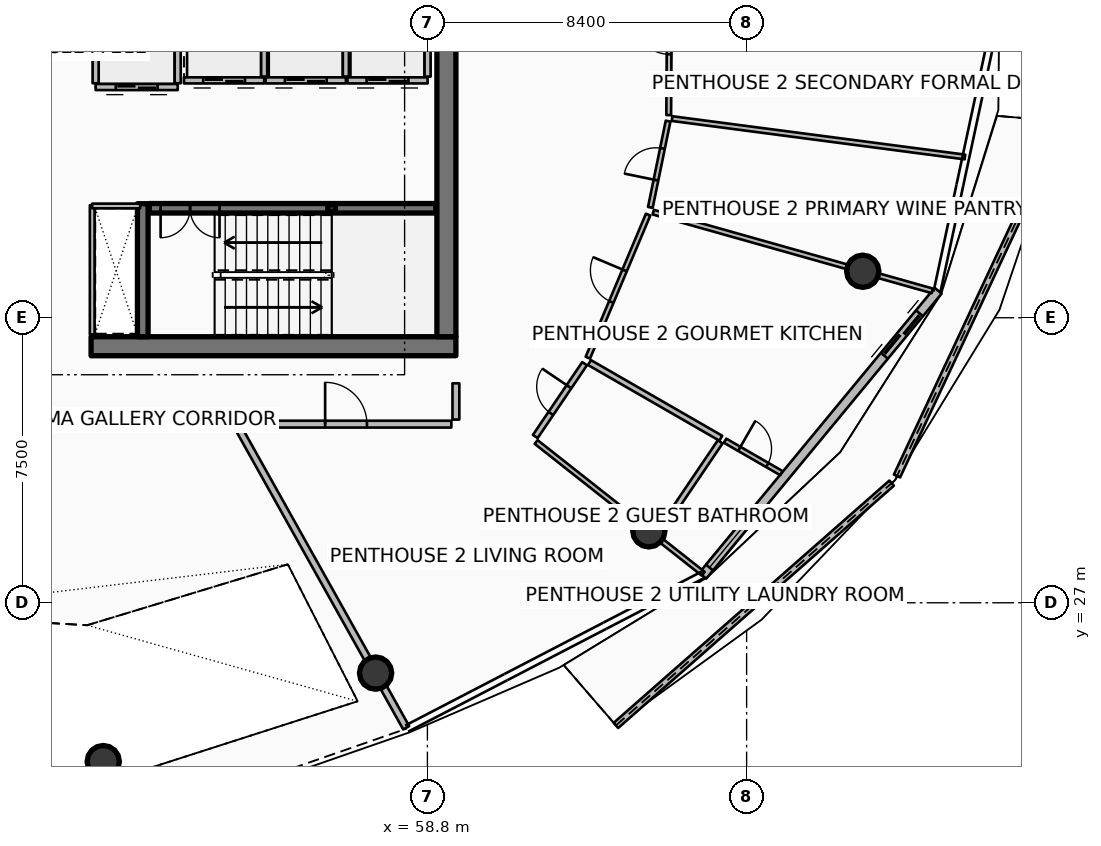
"""IFC4 building model, lengths in metres.
Left out: names, types, materials, properties, quantities, classifications, styles, units other than length and angle.
Written with IfcOpenShell. Run it as: python <this file> out.ifc"""

import sys

from ifc_helpers import new_model, si_unit, direction, frame, frame_2d, origin, origin_2d, place, context, subcontext, project, spatial, polyline, rectangle, hollow_rectangle, circle, outline, extrude, element, fill, save


model = new_model("IFC4")
c1 = context("Model", 3, precision=1e-05, world=origin(), true_north=direction((0.0, 1.0)))
c2 = subcontext(c1, "Body", "Model", "MODEL_VIEW")
j1 = project(units=[si_unit("LENGTHUNIT", "METRE"), si_unit("PLANEANGLEUNIT", "RADIAN")], contexts=[c1])
p1 = place(None, origin())
s1 = spatial("IfcSite", under=j1, at=p1, CompositionType="ELEMENT")
p2 = place(p1, origin())
s2 = spatial("IfcBuilding", under=s1, at=p2, CompositionType="ELEMENT")
p3 = place(p2, frame((0.0, 0.0, 326.3)))
s3 = spatial("IfcBuildingStorey", under=s2, at=p3, CompositionType="ELEMENT", Elevation=326.3)
p4 = place(p3, frame((49.95, 33.75, 0.0), z_axis=(0.0, 0.0, 1.0), x_axis=(1.0, 0.0, 0.0)))
e1 = element("IfcWall", 1, at=p4, inside=s3, PredefinedType="SHEAR", context=c2, shape_type="SweptSolid", body=[
    extrude(rectangle(XDim=9.6, YDim=0.5, at=frame_2d((4.8, 0.0))), origin(), (0.0, 0.0, 1.0), 4.2),
])
p5 = place(p3, frame((59.3, 34.0, 0.0), z_axis=(0.0, 0.0, 1.0), x_axis=(0.0, 1.0, 0.0)))
e2 = element("IfcWall", 2, at=p5, inside=s3, PredefinedType="SHEAR", context=c2, shape_type="SweptSolid", body=[
    extrude(rectangle(XDim=16.0, YDim=0.5, at=frame_2d((8.0, 0.0))), origin(), (0.0, 0.0, 1.0), 4.2),
])
p6 = place(p3, frame((51.31, 34.0, 0.0), z_axis=(0.0, 0.0, 1.0), x_axis=(0.0, 1.0, 0.0)))
e3 = element("IfcWall", 3, at=p6, inside=s3, PredefinedType="SHEAR", context=c2, shape_type="SweptSolid", body=[
    extrude(rectangle(XDim=3.5, YDim=0.28, at=frame_2d((1.75, 0.0))), origin(), (0.0, 0.0, 1.0), 4.2),
])
p7 = place(p3, frame((56.28, 37.38, 0.0), z_axis=(0.0, 0.0, 1.0), x_axis=(1.0, 0.0, 0.0)))
e4 = element("IfcColumn", 4, at=p7, inside=s3, PredefinedType="COLUMN", context=c2, shape_type="SweptSolid", body=[
    extrude(hollow_rectangle(XDim=0.2, YDim=0.2, WallThickness=0.01, InnerFilletRadius=0.01, OuterFilletRadius=0.02, at=origin_2d()), origin(), (0.0, 0.0, 1.0), 1.895),
])
p8 = place(p3, frame((50.27, 22.821, 0.0), z_axis=(0.0, 0.0, 1.0), x_axis=(1.0, 0.0, 0.0)))
e5 = element("IfcColumn", 5, at=p8, inside=s3, PredefinedType="COLUMN", context=c2, shape_type="SweptSolid", body=[
    extrude(circle(Radius=0.425, at=origin_2d()), origin(), (0.0, 0.0, 1.0), 4.196),
])
for number, where, z_axis, x_axis in (
    (6, (57.437, 25.149, 0.0), (0.0, 0.0, 1.0), (1.0, 0.0, 0.0)),
    (7, (64.626, 28.893, 0.0), (0.0, 0.0, 1.0), (1.0, 0.0, 0.0)),
    (8, (70.256, 35.723, 0.0), (0.0, 0.0, 1.0), (1.0, 0.0, 0.0)),
):
    element("IfcColumn", number, at=place(p3, frame(where, z_axis=z_axis, x_axis=x_axis)), inside=s3, PredefinedType="COLUMN", context=c2, shape_type="SweptSolid", body=[
        extrude(circle(Radius=0.425, at=origin_2d()), origin(), (0.0, 0.0, 1.0), 3.94),
    ])
p9 = place(p3, frame((63.761, 23.773, 0.0), z_axis=(0.0, 0.0, 1.0), x_axis=(0.751214275419, 0.660058415905, 0.0)))
e9 = element("IfcWall", 9, at=p9, inside=s3, PredefinedType="PARAPET", context=c2, shape_type="SweptSolid", body=[
    extrude(outline(polyline([(0.0, 0.0), (9.658, 0.0), (9.658, 1.148), (4.829, 1.284), (0.0, 1.483), (0.0, 0.0)])), frame((0.0, 0.09, 0.0), z_axis=(0.0, -1.0, 0.0), x_axis=(1.0, 0.0, 0.0)), (0.0, 0.0, 1.0), 0.18),
])
p10 = place(p3, frame((71.157, 30.336, 0.0), z_axis=(0.0, 0.0, 1.0), x_axis=(0.424201912102, 0.905567632907, 0.0)))
e10 = element("IfcWall", 10, at=p10, inside=s3, PredefinedType="PARAPET", context=c2, shape_type="SweptSolid", body=[
    extrude(outline(polyline([(0.0, 0.0), (10.302, 0.0), (10.302, 1.224), (5.151, 1.127), (0.0, 1.148), (0.0, 0.0)])), frame((0.0, 0.09, 0.0), z_axis=(0.0, -1.0, 0.0), x_axis=(1.0, 0.0, 0.0)), (0.0, 0.0, 1.0), 0.18),
])
p11 = place(p3, frame((66.045, 27.711, 0.0), z_axis=(0.0, 0.0, 1.0), x_axis=(0.636803612721, 0.771026042897, 0.0)))
e11 = element("IfcWall", 11, at=p11, inside=s3, PredefinedType="SOLIDWALL", context=c2, shape_type="SweptSolid", body=[
    extrude(rectangle(XDim=9.728, YDim=0.24, at=frame_2d((4.864, 0.0))), origin(), (0.0, 0.0, 1.0), 2.89),
])
p12 = place(p11, frame((7.508, 0.0, 0.0)))
e12 = element("IfcOpeningElement", 12, at=p12, cuts=e11, PredefinedType="OPENING", context=c2, shape_type="SweptSolid", body=[
    extrude(rectangle(XDim=1.45, YDim=2.15, at=frame_2d((0.725, 1.075))), frame((0.0, 0.13, 0.0), z_axis=(0.0, -1.0, 0.0), x_axis=(1.0, 0.0, 0.0)), (0.0, 0.0, 1.0), 0.26),
])
p13 = place(p11, frame((0.28, 0.0, 0.65)))
e13 = element("IfcOpeningElement", 13, at=p13, cuts=e11, PredefinedType="OPENING", context=c2, shape_type="SweptSolid", body=[
    extrude(rectangle(XDim=1.6, YDim=1.5, at=frame_2d((0.8, 0.75))), frame((0.0, 0.13, 0.0), z_axis=(0.0, -1.0, 0.0), x_axis=(1.0, 0.0, 0.0)), (0.0, 0.0, 1.0), 0.26),
])
p14 = place(p3, frame((51.48, 37.38, 0.0), z_axis=(0.0, 0.0, 1.0), x_axis=(1.0, 0.0, 0.0)))
e14 = element("IfcWall", 14, at=p14, inside=s3, PredefinedType="SOLIDWALL", context=c2, shape_type="SweptSolid", body=[
    extrude(rectangle(XDim=7.54, YDim=0.25, at=frame_2d((3.77, 0.0))), origin(), (0.0, 0.0, 1.0), 3.94),
])
p15 = place(p14, frame((0.3, 0.0, 0.0)))
e15 = element("IfcOpeningElement", 15, at=p15, cuts=e14, PredefinedType="OPENING", context=c2, shape_type="SweptSolid", body=[
    extrude(rectangle(XDim=1.55, YDim=2.15, at=frame_2d((0.775, 1.075))), frame((0.0, 0.135, 0.0), z_axis=(0.0, -1.0, 0.0), x_axis=(1.0, 0.0, 0.0)), (0.0, 0.0, 1.0), 0.27),
])
p16 = place(p3, frame((54.505, 40.745, 0.0), z_axis=(0.0, 0.0, 1.0), x_axis=(-1.0, 0.0, 0.0)))
e16 = element("IfcWall", 16, at=p16, inside=s3, PredefinedType="PARTITIONING", context=c2, shape_type="SweptSolid", body=[
    extrude(rectangle(XDim=2.11, YDim=0.16, at=frame_2d((1.055, 0.0))), origin(), (0.0, 0.0, 1.0), 3.94),
])
p17 = place(p16, frame((0.505, 0.0, 0.0)))
e17 = element("IfcOpeningElement", 17, at=p17, cuts=e16, PredefinedType="OPENING", context=c2, shape_type="SweptSolid", body=[
    extrude(rectangle(XDim=1.1, YDim=2.1, at=frame_2d((0.55, 1.05))), frame((0.0, 0.09, 0.0), z_axis=(0.0, -1.0, 0.0), x_axis=(1.0, 0.0, 0.0)), (0.0, 0.0, 1.0), 0.18),
])
p18 = place(p3, frame((54.505, 40.845, 0.0), z_axis=(0.0, 0.0, 1.0), x_axis=(0.0, 1.0, 0.0)))
e18 = element("IfcWall", 18, at=p18, inside=s3, PredefinedType="PARTITIONING", context=c2, shape_type="SweptSolid", body=[
    extrude(rectangle(XDim=1.61, YDim=0.16, at=frame_2d((0.805, 0.0))), origin(), (0.0, 0.0, 1.0), 3.94),
])
p19 = place(p3, frame((56.655, 40.745, 0.0), z_axis=(0.0, 0.0, 1.0), x_axis=(-1.0, 0.0, 0.0)))
e19 = element("IfcWall", 19, at=p19, inside=s3, PredefinedType="PARTITIONING", context=c2, shape_type="SweptSolid", body=[
    extrude(rectangle(XDim=2.11, YDim=0.16, at=frame_2d((1.055, 0.0))), origin(), (0.0, 0.0, 1.0), 3.94),
])
p20 = place(p19, frame((0.505, 0.0, 0.0)))
e20 = element("IfcOpeningElement", 20, at=p20, cuts=e19, PredefinedType="OPENING", context=c2, shape_type="SweptSolid", body=[
    extrude(rectangle(XDim=1.1, YDim=2.1, at=frame_2d((0.55, 1.05))), frame((0.0, 0.09, 0.0), z_axis=(0.0, -1.0, 0.0), x_axis=(1.0, 0.0, 0.0)), (0.0, 0.0, 1.0), 0.18),
])
p21 = place(p3, frame((56.655, 40.845, 0.0), z_axis=(0.0, 0.0, 1.0), x_axis=(0.0, 1.0, 0.0)))
e21 = element("IfcWall", 21, at=p21, inside=s3, PredefinedType="PARTITIONING", context=c2, shape_type="SweptSolid", body=[
    extrude(rectangle(XDim=1.61, YDim=0.16, at=frame_2d((0.805, 0.0))), origin(), (0.0, 0.0, 1.0), 3.94),
])
p22 = place(p3, frame((58.805, 40.745, 0.0), z_axis=(0.0, 0.0, 1.0), x_axis=(-1.0, 0.0, 0.0)))
e22 = element("IfcWall", 22, at=p22, inside=s3, PredefinedType="PARTITIONING", context=c2, shape_type="SweptSolid", body=[
    extrude(rectangle(XDim=2.11, YDim=0.16, at=frame_2d((1.055, 0.0))), origin(), (0.0, 0.0, 1.0), 3.94),
])
p23 = place(p22, frame((0.505, 0.0, 0.0)))
e23 = element("IfcOpeningElement", 23, at=p23, cuts=e22, PredefinedType="OPENING", context=c2, shape_type="SweptSolid", body=[
    extrude(rectangle(XDim=1.1, YDim=2.1, at=frame_2d((0.55, 1.05))), frame((0.0, 0.09, 0.0), z_axis=(0.0, -1.0, 0.0), x_axis=(1.0, 0.0, 0.0)), (0.0, 0.0, 1.0), 0.18),
])
p24 = place(p3, frame((58.805, 40.845, 0.0), z_axis=(0.0, 0.0, 1.0), x_axis=(0.0, 1.0, 0.0)))
e24 = element("IfcWall", 24, at=p24, inside=s3, PredefinedType="PARTITIONING", context=c2, shape_type="SweptSolid", body=[
    extrude(rectangle(XDim=1.61, YDim=0.16, at=frame_2d((0.805, 0.0))), origin(), (0.0, 0.0, 1.0), 3.94),
])
p25 = place(p3, frame((52.23, 40.57, 0.0), z_axis=(0.0, 0.0, 1.0), x_axis=(-1.0, 0.0, 0.0)))
e25 = element("IfcWall", 25, at=p25, inside=s3, PredefinedType="PARTITIONING", context=c2, shape_type="SweptSolid", body=[
    extrude(rectangle(XDim=2.16, YDim=0.16, at=frame_2d((1.08, 0.0))), origin(), (0.0, 0.0, 1.0), 3.94),
])
p26 = place(p25, frame((0.53, 0.0, 0.0)))
e26 = element("IfcOpeningElement", 26, at=p26, cuts=e25, PredefinedType="OPENING", context=c2, shape_type="SweptSolid", body=[
    extrude(rectangle(XDim=1.1, YDim=2.1, at=frame_2d((0.55, 1.05))), frame((0.0, 0.09, 0.0), z_axis=(0.0, -1.0, 0.0), x_axis=(1.0, 0.0, 0.0)), (0.0, 0.0, 1.0), 0.18),
])
for number, where, z_axis, x_axis in (
    (27, (52.23, 40.67, 0.0), (0.0, 0.0, 1.0), (0.0, 1.0, 0.0)),
    (28, (50.07, 40.67, 0.0), (0.0, 0.0, 1.0), (0.0, 1.0, 0.0)),
):
    element("IfcWall", number, at=place(p3, frame(where, z_axis=z_axis, x_axis=x_axis)), inside=s3, PredefinedType="PARTITIONING", context=c2, shape_type="SweptSolid", body=[
        extrude(rectangle(XDim=2.16, YDim=0.16, at=frame_2d((1.08, 0.0))), origin(), (0.0, 0.0, 1.0), 3.94),
    ])
p27 = place(p3, frame((49.98, 34.06, 0.0), z_axis=(0.0, 0.0, 1.0), x_axis=(0.0, 1.0, 0.0)))
e29 = element("IfcWall", 29, at=p27, inside=s3, PredefinedType="PARTITIONING", context=c2, shape_type="SweptSolid", body=[
    extrude(rectangle(XDim=3.4, YDim=0.125, at=frame_2d((1.7, 0.0))), origin(), (0.0, 0.0, 1.0), 3.38),
])
p28 = place(p3, frame((49.98, 37.44, 0.0), z_axis=(0.0, 0.0, 1.0), x_axis=(1.0, 0.0, 0.0)))
e30 = element("IfcWall", 30, at=p28, inside=s3, PredefinedType="PARTITIONING", context=c2, shape_type="SweptSolid", body=[
    extrude(rectangle(XDim=1.26, YDim=0.125, at=frame_2d((0.63, 0.0))), origin(), (0.0, 0.0, 1.0), 3.38),
])
p29 = place(p3, frame((45.165, 31.7, 0.0), z_axis=(0.0, 0.0, 1.0), x_axis=(1.0, 0.0, 0.0)))
e31 = element("IfcWall", 31, at=p29, inside=s3, PredefinedType="SOLIDWALL", context=c2, shape_type="SweptSolid", body=[
    extrude(rectangle(XDim=8.533, YDim=0.24, at=frame_2d((4.267, 0.0))), origin(), (0.0, 0.0, 1.0), 3.38),
])
p30 = place(p3, frame((53.768, 31.7, 0.0), z_axis=(0.0, 0.0, 1.0), x_axis=(0.488623665245, -0.872494649704, 0.0)))
e32 = element("IfcWall", 32, at=p30, inside=s3, PredefinedType="PARTITIONING", context=c2, shape_type="SweptSolid", body=[
    extrude(rectangle(XDim=9.157, YDim=0.18, at=frame_2d((4.579, 0.0))), origin(), (0.0, 0.0, 1.0), 3.38),
])
p31 = place(p3, frame((53.888, 31.7, 0.0), z_axis=(0.0, 0.0, 1.0), x_axis=(1.0, 0.0, 0.0)))
e33 = element("IfcWall", 33, at=p31, inside=s3, PredefinedType="PARTITIONING", context=c2, shape_type="SweptSolid", body=[
    extrude(rectangle(XDim=5.542, YDim=0.18, at=frame_2d((2.771, 0.0))), origin(), (0.0, 0.0, 1.0), 3.38),
])
p32 = place(p31, frame((2.221, 0.0, 0.0)))
e34 = element("IfcOpeningElement", 34, at=p32, cuts=e33, PredefinedType="OPENING", context=c2, shape_type="SweptSolid", body=[
    extrude(rectangle(XDim=1.1, YDim=2.1, at=frame_2d((0.55, 1.05))), frame((0.0, 0.1, 0.0), z_axis=(0.0, -1.0, 0.0), x_axis=(1.0, 0.0, 0.0)), (0.0, 0.0, 1.0), 0.2),
])
p33 = place(p3, frame((59.55, 31.82, 0.0), z_axis=(0.0, 0.0, 1.0), x_axis=(0.0, 1.0, 0.0)))
e35 = element("IfcWall", 35, at=p33, inside=s3, PredefinedType="PARTITIONING", context=c2, shape_type="SweptSolid", body=[
    extrude(rectangle(XDim=0.955, YDim=0.18, at=frame_2d((0.477, 0.0))), origin(), (0.0, 0.0, 1.0), 3.38),
])
p34 = place(p3, frame((61.661, 31.23, 0.0), z_axis=(0.0, 0.0, 1.0), x_axis=(0.785321366699, -0.61908832246, 0.0)))
e36 = element("IfcWall", 36, at=p34, inside=s3, PredefinedType="PARTITIONING", context=c2, shape_type="SweptSolid", body=[
    extrude(rectangle(XDim=5.597, YDim=0.125, at=frame_2d((2.799, 0.0))), origin(), (0.0, 0.0, 1.0), 3.38),
])
p35 = place(p3, frame((61.639, 31.375, 0.0), z_axis=(0.0, 0.0, 1.0), x_axis=(0.56062651507, 0.828068783738, 0.0)))
e37 = element("IfcWall", 37, at=p35, inside=s3, PredefinedType="PARTITIONING", context=c2, shape_type="SweptSolid", body=[
    extrude(rectangle(XDim=2.314, YDim=0.15, at=frame_2d((1.157, 0.0))), origin(), (0.0, 0.0, 1.0), 3.38),
])
p36 = place(p35, frame((0.732, 0.0, 0.0)))
e38 = element("IfcOpeningElement", 38, at=p36, cuts=e37, PredefinedType="OPENING", context=c2, shape_type="SweptSolid", body=[
    extrude(rectangle(XDim=0.85, YDim=2.06, at=frame_2d((0.425, 1.03))), frame((0.0, 0.085, 0.0), z_axis=(0.0, -1.0, 0.0), x_axis=(1.0, 0.0, 0.0)), (0.0, 0.0, 1.0), 0.17),
])
p37 = place(p3, frame((64.874, 28.825, 0.0), z_axis=(0.0, 0.0, 1.0), x_axis=(0.560532780406, 0.82813223708, 0.0)))
e39 = element("IfcWall", 39, at=p37, inside=s3, PredefinedType="PARTITIONING", context=c2, shape_type="SweptSolid", body=[
    extrude(rectangle(XDim=2.91, YDim=0.15, at=frame_2d((1.455, 0.0))), origin(), (0.0, 0.0, 1.0), 3.38),
])
p38 = place(p3, frame((63.065, 33.321, 0.0), z_axis=(0.0, 0.0, 1.0), x_axis=(0.866490095299, -0.499194265541, 0.0)))
e40 = element("IfcWall", 40, at=p38, inside=s3, PredefinedType="PARTITIONING", context=c2, shape_type="SweptSolid", body=[
    extrude(rectangle(XDim=3.989, YDim=0.15, at=frame_2d((1.994, 0.0))), origin(), (0.0, 0.0, 1.0), 3.38),
])
p39 = place(p3, frame((66.634, 31.265, 0.0), z_axis=(0.0, 0.0, 1.0), x_axis=(0.866444624685, -0.499273184094, 0.0)))
e41 = element("IfcWall", 41, at=p39, inside=s3, PredefinedType="PARTITIONING", context=c2, shape_type="SweptSolid", body=[
    extrude(rectangle(XDim=1.709, YDim=0.125, at=frame_2d((0.855, 0.0))), origin(), (0.0, 0.0, 1.0), 3.38),
])
p40 = place(p39, frame((0.43, 0.0, 0.0)))
e42 = element("IfcOpeningElement", 42, at=p40, cuts=e41, PredefinedType="OPENING", context=c2, shape_type="SweptSolid", body=[
    extrude(rectangle(XDim=0.85, YDim=2.06, at=frame_2d((0.425, 1.03))), frame((0.0, 0.073, 0.0), z_axis=(0.0, -1.0, 0.0), x_axis=(1.0, 0.0, 0.0)), (0.0, 0.0, 1.0), 0.145),
])
p41 = place(p3, frame((63.021, 33.448, 0.0), z_axis=(0.0, 0.0, 1.0), x_axis=(0.388350881923, 0.921511580236, 0.0)))
e43 = element("IfcWall", 43, at=p41, inside=s3, PredefinedType="PARTITIONING", context=c2, shape_type="SweptSolid", body=[
    extrude(rectangle(XDim=4.085, YDim=0.125, at=frame_2d((2.042, 0.0))), origin(), (0.0, 0.0, 1.0), 3.38),
])
p42 = place(p41, frame((1.593, 0.0, 0.0)))
e44 = element("IfcOpeningElement", 44, at=p42, cuts=e43, PredefinedType="OPENING", context=c2, shape_type="SweptSolid", body=[
    extrude(rectangle(XDim=0.9, YDim=2.08, at=frame_2d((0.45, 1.04))), frame((0.0, 0.073, 0.0), z_axis=(0.0, -1.0, 0.0), x_axis=(1.0, 0.0, 0.0)), (0.0, 0.0, 1.0), 0.145),
])
p43 = place(p3, frame((64.743, 37.278, 0.0), z_axis=(0.0, 0.0, 1.0), x_axis=(0.962455248497, -0.271440407162, 0.0)))
e45 = element("IfcWall", 45, at=p43, inside=s3, PredefinedType="PARTITIONING", context=c2, shape_type="SweptSolid", body=[
    extrude(rectangle(XDim=7.631, YDim=0.125, at=frame_2d((3.815, 0.0))), origin(), (0.0, 0.0, 1.0), 3.38),
])
p44 = place(p3, frame((65.238, 39.74, 0.0), z_axis=(0.0, 0.0, 1.0), x_axis=(0.991512783403, -0.130009231784, 0.0)))
e46 = element("IfcWall", 46, at=p44, inside=s3, PredefinedType="PARTITIONING", context=c2, shape_type="SweptSolid", body=[
    extrude(rectangle(XDim=7.772, YDim=0.125, at=frame_2d((3.886, 0.0))), origin(), (0.0, 0.0, 1.0), 3.38),
])
p45 = place(p3, frame((64.667, 37.403, 0.0), z_axis=(0.0, 0.0, 1.0), x_axis=(0.201239677413, 0.979542031888, 0.0)))
e47 = element("IfcWall", 47, at=p45, inside=s3, PredefinedType="PARTITIONING", context=c2, shape_type="SweptSolid", body=[
    extrude(rectangle(XDim=2.317, YDim=0.125, at=frame_2d((1.159, 0.0))), origin(), (0.0, 0.0, 1.0), 3.38),
])
p46 = place(p45, frame((0.734, 0.0, 0.0)))
e48 = element("IfcOpeningElement", 48, at=p46, cuts=e47, PredefinedType="OPENING", context=c2, shape_type="SweptSolid", body=[
    extrude(rectangle(XDim=0.85, YDim=2.06, at=frame_2d((0.425, 1.03))), frame((0.0, 0.073, 0.0), z_axis=(0.0, -1.0, 0.0), x_axis=(1.0, 0.0, 0.0)), (0.0, 0.0, 1.0), 0.145),
])
p47 = place(p3, frame((65.15, 39.831, 0.0), z_axis=(0.0, 0.0, 1.0), x_axis=(0.006309398222, 0.999980095549, 0.0)))
e49 = element("IfcWall", 49, at=p47, inside=s3, PredefinedType="PARTITIONING", context=c2, shape_type="SweptSolid", body=[
    extrude(rectangle(XDim=4.102, YDim=0.125, at=frame_2d((2.051, 0.0))), origin(), (0.0, 0.0, 1.0), 3.38),
])
p48 = place(p47, frame((1.601, 0.0, 0.0)))
e50 = element("IfcOpeningElement", 50, at=p48, cuts=e49, PredefinedType="OPENING", context=c2, shape_type="SweptSolid", body=[
    extrude(rectangle(XDim=0.9, YDim=2.08, at=frame_2d((0.45, 1.04))), frame((0.0, 0.073, 0.0), z_axis=(0.0, -1.0, 0.0), x_axis=(1.0, 0.0, 0.0)), (0.0, 0.0, 1.0), 0.145),
])
p49 = place(p12, origin())
e51 = element("IfcDoor", 51, at=p49, inside=s3, OperationType="DOUBLE_DOOR_SLIDING", PredefinedType="DOOR", context=c2, shape_type="SweptSolid", body=[
    extrude(rectangle(XDim=1.45, YDim=2.15, at=frame_2d((0.725, 1.075))), frame((0.0, 0.025, 0.0), z_axis=(0.0, -1.0, 0.0), x_axis=(1.0, 0.0, 0.0)), (0.0, 0.0, 1.0), 0.05),
])
fill(e12, e51)
p50 = place(p13, origin())
e52 = element("IfcWindow", 52, at=p50, inside=s3, PartitioningType="SINGLE_PANEL", PredefinedType="WINDOW", context=c2, shape_type="SweptSolid", body=[
    extrude(rectangle(XDim=1.6, YDim=1.5, at=frame_2d((0.8, 0.75))), frame((0.0, 0.03, 0.0), z_axis=(0.0, -1.0, 0.0), x_axis=(1.0, 0.0, 0.0)), (0.0, 0.0, 1.0), 0.06),
])
fill(e13, e52)
p51 = place(p15, origin())
e53 = element("IfcDoor", 53, at=p51, inside=s3, OperationType="DOUBLE_DOOR_SINGLE_SWING", PredefinedType="DOOR", context=c2, shape_type="SweptSolid", body=[
    extrude(rectangle(XDim=1.55, YDim=2.15, at=frame_2d((0.775, 1.075))), frame((0.0, 0.025, 0.0), z_axis=(0.0, -1.0, 0.0), x_axis=(1.0, 0.0, 0.0)), (0.0, 0.0, 1.0), 0.05),
])
fill(e15, e53)
p52 = place(p17, origin())
e54 = element("IfcDoor", 54, at=p52, inside=s3, OperationType="DOUBLE_DOOR_SLIDING", PredefinedType="DOOR", context=c2, shape_type="SweptSolid", body=[
    extrude(rectangle(XDim=1.1, YDim=2.1, at=frame_2d((0.55, 1.05))), frame((0.0, 0.025, 0.0), z_axis=(0.0, -1.0, 0.0), x_axis=(1.0, 0.0, 0.0)), (0.0, 0.0, 1.0), 0.05),
])
fill(e17, e54)
p53 = place(p20, origin())
e55 = element("IfcDoor", 55, at=p53, inside=s3, OperationType="DOUBLE_DOOR_SLIDING", PredefinedType="DOOR", context=c2, shape_type="SweptSolid", body=[
    extrude(rectangle(XDim=1.1, YDim=2.1, at=frame_2d((0.55, 1.05))), frame((0.0, 0.025, 0.0), z_axis=(0.0, -1.0, 0.0), x_axis=(1.0, 0.0, 0.0)), (0.0, 0.0, 1.0), 0.05),
])
fill(e20, e55)
p54 = place(p23, origin())
e56 = element("IfcDoor", 56, at=p54, inside=s3, OperationType="DOUBLE_DOOR_SLIDING", PredefinedType="DOOR", context=c2, shape_type="SweptSolid", body=[
    extrude(rectangle(XDim=1.1, YDim=2.1, at=frame_2d((0.55, 1.05))), frame((0.0, 0.025, 0.0), z_axis=(0.0, -1.0, 0.0), x_axis=(1.0, 0.0, 0.0)), (0.0, 0.0, 1.0), 0.05),
])
fill(e23, e56)
p55 = place(p26, origin())
e57 = element("IfcDoor", 57, at=p55, inside=s3, OperationType="DOUBLE_DOOR_SLIDING", PredefinedType="DOOR", context=c2, shape_type="SweptSolid", body=[
    extrude(rectangle(XDim=1.1, YDim=2.1, at=frame_2d((0.55, 1.05))), frame((0.0, 0.025, 0.0), z_axis=(0.0, -1.0, 0.0), x_axis=(1.0, 0.0, 0.0)), (0.0, 0.0, 1.0), 0.05),
])
fill(e26, e57)
p56 = place(p32, origin())
e58 = element("IfcDoor", 58, at=p56, inside=s3, OperationType="SINGLE_SWING_LEFT", PredefinedType="DOOR", context=c2, shape_type="SweptSolid", body=[
    extrude(rectangle(XDim=1.1, YDim=2.1, at=frame_2d((0.55, 1.05))), frame((0.0, 0.025, 0.0), z_axis=(0.0, -1.0, 0.0), x_axis=(1.0, 0.0, 0.0)), (0.0, 0.0, 1.0), 0.05),
])
fill(e34, e58)
p57 = place(p36, origin())
e59 = element("IfcDoor", 59, at=p57, inside=s3, OperationType="SINGLE_SWING_RIGHT", PredefinedType="DOOR", context=c2, shape_type="SweptSolid", body=[
    extrude(rectangle(XDim=0.85, YDim=2.06, at=frame_2d((0.425, 1.03))), frame((0.0, 0.025, 0.0), z_axis=(0.0, -1.0, 0.0), x_axis=(1.0, 0.0, 0.0)), (0.0, 0.0, 1.0), 0.05),
])
fill(e38, e59)
p58 = place(p40, origin())
e60 = element("IfcDoor", 60, at=p58, inside=s3, OperationType="SINGLE_SWING_LEFT", PredefinedType="DOOR", context=c2, shape_type="SweptSolid", body=[
    extrude(rectangle(XDim=0.85, YDim=2.06, at=frame_2d((0.425, 1.03))), frame((0.0, 0.025, 0.0), z_axis=(0.0, -1.0, 0.0), x_axis=(1.0, 0.0, 0.0)), (0.0, 0.0, 1.0), 0.05),
])
fill(e42, e60)
p59 = place(p42, origin())
e61 = element("IfcDoor", 61, at=p59, inside=s3, OperationType="SINGLE_SWING_RIGHT", PredefinedType="DOOR", context=c2, shape_type="SweptSolid", body=[
    extrude(rectangle(XDim=0.9, YDim=2.08, at=frame_2d((0.45, 1.04))), frame((0.0, 0.025, 0.0), z_axis=(0.0, -1.0, 0.0), x_axis=(1.0, 0.0, 0.0)), (0.0, 0.0, 1.0), 0.05),
])
fill(e44, e61)
p60 = place(p46, origin())
e62 = element("IfcDoor", 62, at=p60, inside=s3, OperationType="SINGLE_SWING_LEFT", PredefinedType="DOOR", context=c2, shape_type="SweptSolid", body=[
    extrude(rectangle(XDim=0.85, YDim=2.06, at=frame_2d((0.425, 1.03))), frame((0.0, 0.025, 0.0), z_axis=(0.0, -1.0, 0.0), x_axis=(1.0, 0.0, 0.0)), (0.0, 0.0, 1.0), 0.05),
])
fill(e48, e62)
p61 = place(p48, origin())
e63 = element("IfcDoor", 63, at=p61, inside=s3, OperationType="SINGLE_SWING_RIGHT", PredefinedType="DOOR", context=c2, shape_type="SweptSolid", body=[
    extrude(rectangle(XDim=0.9, YDim=2.08, at=frame_2d((0.45, 1.04))), frame((0.0, 0.025, 0.0), z_axis=(0.0, -1.0, 0.0), x_axis=(1.0, 0.0, 0.0)), (0.0, 0.0, 1.0), 0.05),
])
fill(e50, e63)
save(model, sys.argv[1])
